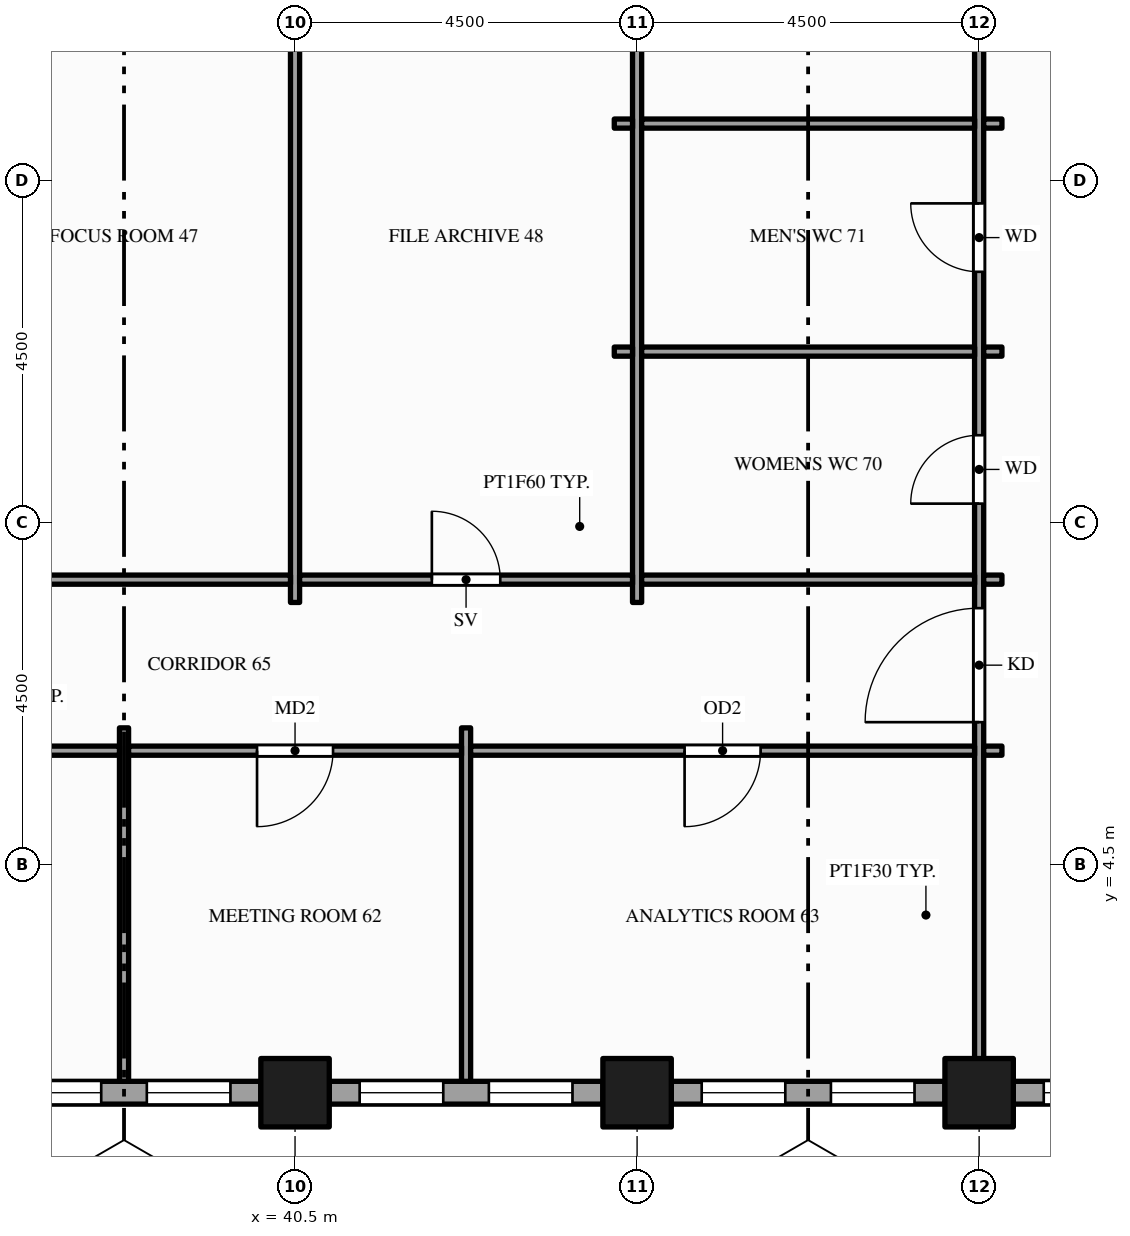
"""IFC4 building model, lengths in metres.
Left out: names, types, materials, properties, quantities, classifications, styles, units other than length and angle.
Written with IfcOpenShell. Run it as: python <this file> out.ifc"""

import sys

from ifc_helpers import new_model, si_unit, direction, frame, frame_2d, origin, origin_2d, place, context, subcontext, project, spatial, rectangle, hollow_rectangle, extrude, element, fill, save


model = new_model("IFC4")
c1 = context("Model", 3, precision=1e-05, world=origin(), true_north=direction((0.0, 1.0)))
c2 = subcontext(c1, "Body", "Model", "MODEL_VIEW")
j1 = project(units=[si_unit("LENGTHUNIT", "METRE"), si_unit("PLANEANGLEUNIT", "RADIAN")], contexts=[c1])
p1 = place(None, origin())
s1 = spatial("IfcSite", under=j1, at=p1, CompositionType="ELEMENT")
p2 = place(p1, origin())
s2 = spatial("IfcBuilding", under=s1, at=p2, CompositionType="ELEMENT")
p3 = place(p2, frame((0.0, 0.0, 179.0)))
s3 = spatial("IfcBuildingStorey", under=s2, at=p3, CompositionType="ELEMENT", Elevation=179.0)
for number, where, z_axis, x_axis in (
    (1, (40.5, 1.5, -0.15), (0.0, 0.0, 1.0), (1.0, 0.0, 0.0)),
    (2, (45.0, 1.5, -0.15), (0.0, 0.0, 1.0), (1.0, 0.0, 0.0)),
    (3, (49.5, 1.5, -0.15), (0.0, 0.0, 1.0), (1.0, 0.0, 0.0)),
):
    element("IfcColumn", number, at=place(p3, frame(where, z_axis=z_axis, x_axis=x_axis)), inside=s3, PredefinedType="COLUMN", context=c2, shape_type="SweptSolid", body=[
        extrude(hollow_rectangle(XDim=0.9, YDim=0.9, WallThickness=0.045, at=origin_2d()), origin(), (0.0, 0.0, 1.0), 4.0),
    ])
p4 = place(p3, frame((36.45, 1.5, 0.0), z_axis=(0.0, 0.0, 1.0), x_axis=(1.0, 0.0, 0.0)))
e4 = element("IfcWall", 4, at=p4, inside=s3, PredefinedType="STANDARD", context=c2, shape_type="SweptSolid", body=[
    extrude(rectangle(XDim=3.6, YDim=0.3, at=frame_2d((1.8, 0.0))), origin(), (0.0, 0.0, 1.0), 2.87),
])
p5 = place(p4, frame((0.4, 0.0, 0.9)))
e5 = element("IfcOpeningElement", 5, at=p5, cuts=e4, PredefinedType="OPENING", context=c2, shape_type="SweptSolid", body=[
    extrude(rectangle(XDim=1.1, YDim=1.75, at=frame_2d((0.55, 0.875))), frame((0.0, 0.16, 0.0), z_axis=(0.0, -1.0, 0.0), x_axis=(1.0, 0.0, 0.0)), (0.0, 0.0, 1.0), 0.32),
])
p6 = place(p4, frame((2.1, 0.0, 0.9)))
e6 = element("IfcOpeningElement", 6, at=p6, cuts=e4, PredefinedType="OPENING", context=c2, shape_type="SweptSolid", body=[
    extrude(rectangle(XDim=1.1, YDim=1.75, at=frame_2d((0.55, 0.875))), frame((0.0, 0.16, 0.0), z_axis=(0.0, -1.0, 0.0), x_axis=(1.0, 0.0, 0.0)), (0.0, 0.0, 1.0), 0.32),
])
p7 = place(p3, frame((40.95, 1.5, 0.0), z_axis=(0.0, 0.0, 1.0), x_axis=(1.0, 0.0, 0.0)))
e7 = element("IfcWall", 7, at=p7, inside=s3, PredefinedType="STANDARD", context=c2, shape_type="SweptSolid", body=[
    extrude(rectangle(XDim=3.6, YDim=0.3, at=frame_2d((1.8, 0.0))), origin(), (0.0, 0.0, 1.0), 2.87),
])
p8 = place(p7, frame((0.4, 0.0, 0.9)))
e8 = element("IfcOpeningElement", 8, at=p8, cuts=e7, PredefinedType="OPENING", context=c2, shape_type="SweptSolid", body=[
    extrude(rectangle(XDim=1.1, YDim=1.75, at=frame_2d((0.55, 0.875))), frame((0.0, 0.16, 0.0), z_axis=(0.0, -1.0, 0.0), x_axis=(1.0, 0.0, 0.0)), (0.0, 0.0, 1.0), 0.32),
])
p9 = place(p7, frame((2.1, 0.0, 0.9)))
e9 = element("IfcOpeningElement", 9, at=p9, cuts=e7, PredefinedType="OPENING", context=c2, shape_type="SweptSolid", body=[
    extrude(rectangle(XDim=1.1, YDim=1.75, at=frame_2d((0.55, 0.875))), frame((0.0, 0.16, 0.0), z_axis=(0.0, -1.0, 0.0), x_axis=(1.0, 0.0, 0.0)), (0.0, 0.0, 1.0), 0.32),
])
p10 = place(p3, frame((45.45, 1.5, 0.0), z_axis=(0.0, 0.0, 1.0), x_axis=(1.0, 0.0, 0.0)))
e10 = element("IfcWall", 10, at=p10, inside=s3, PredefinedType="STANDARD", context=c2, shape_type="SweptSolid", body=[
    extrude(rectangle(XDim=3.6, YDim=0.3, at=frame_2d((1.8, 0.0))), origin(), (0.0, 0.0, 1.0), 2.87),
])
p11 = place(p10, frame((0.4, 0.0, 0.9)))
e11 = element("IfcOpeningElement", 11, at=p11, cuts=e10, PredefinedType="OPENING", context=c2, shape_type="SweptSolid", body=[
    extrude(rectangle(XDim=1.1, YDim=1.75, at=frame_2d((0.55, 0.875))), frame((0.0, 0.16, 0.0), z_axis=(0.0, -1.0, 0.0), x_axis=(1.0, 0.0, 0.0)), (0.0, 0.0, 1.0), 0.32),
])
p12 = place(p10, frame((2.1, 0.0, 0.9)))
e12 = element("IfcOpeningElement", 12, at=p12, cuts=e10, PredefinedType="OPENING", context=c2, shape_type="SweptSolid", body=[
    extrude(rectangle(XDim=1.1, YDim=1.75, at=frame_2d((0.55, 0.875))), frame((0.0, 0.16, 0.0), z_axis=(0.0, -1.0, 0.0), x_axis=(1.0, 0.0, 0.0)), (0.0, 0.0, 1.0), 0.32),
])
p13 = place(p3, frame((49.95, 1.5, 0.0), z_axis=(0.0, 0.0, 1.0), x_axis=(1.0, 0.0, 0.0)))
e13 = element("IfcWall", 13, at=p13, inside=s3, PredefinedType="STANDARD", context=c2, shape_type="SweptSolid", body=[
    extrude(rectangle(XDim=4.05, YDim=0.3, at=frame_2d((2.025, 0.0))), origin(), (0.0, 0.0, 1.0), 2.87),
])
p14 = place(p13, frame((0.4, 0.0, 0.9)))
e14 = element("IfcOpeningElement", 14, at=p14, cuts=e13, PredefinedType="OPENING", context=c2, shape_type="SweptSolid", body=[
    extrude(rectangle(XDim=1.1, YDim=1.75, at=frame_2d((0.55, 0.875))), frame((0.0, 0.16, 0.0), z_axis=(0.0, -1.0, 0.0), x_axis=(1.0, 0.0, 0.0)), (0.0, 0.0, 1.0), 0.32),
])
p15 = place(p13, frame((2.1, 0.0, 0.9)))
e15 = element("IfcOpeningElement", 15, at=p15, cuts=e13, PredefinedType="OPENING", context=c2, shape_type="SweptSolid", body=[
    extrude(rectangle(XDim=1.55, YDim=1.75, at=frame_2d((0.775, 0.875))), frame((0.0, 0.16, 0.0), z_axis=(0.0, -1.0, 0.0), x_axis=(1.0, 0.0, 0.0)), (0.0, 0.0, 1.0), 0.32),
])
p16 = place(p3, frame((38.25, 1.65, 0.0), z_axis=(0.0, 0.0, 1.0), x_axis=(0.0, 1.0, 0.0)))
e16 = element("IfcWall", 16, at=p16, inside=s3, PredefinedType="PARTITIONING", context=c2, shape_type="SweptSolid", body=[
    extrude(rectangle(XDim=4.65, YDim=0.12, at=frame_2d((2.325, 0.0))), origin(), (0.0, 0.0, 1.0), 2.87),
])
p17 = place(p3, frame((40.5, 7.95, 0.0), z_axis=(0.0, 0.0, 1.0), x_axis=(0.0, 1.0, 0.0)))
e17 = element("IfcWall", 17, at=p17, inside=s3, PredefinedType="PARTITIONING", context=c2, shape_type="SweptSolid", body=[
    extrude(rectangle(XDim=9.6, YDim=0.12, at=frame_2d((4.8, 0.0))), origin(), (0.0, 0.0, 1.0), 2.87),
])
p18 = place(p3, frame((42.75, 1.65, 0.0), z_axis=(0.0, 0.0, 1.0), x_axis=(0.0, 1.0, 0.0)))
e18 = element("IfcWall", 18, at=p18, inside=s3, PredefinedType="PARTITIONING", context=c2, shape_type="SweptSolid", body=[
    extrude(rectangle(XDim=4.65, YDim=0.12, at=frame_2d((2.325, 0.0))), origin(), (0.0, 0.0, 1.0), 2.87),
])
p19 = place(p3, frame((45.0, 7.95, 0.0), z_axis=(0.0, 0.0, 1.0), x_axis=(0.0, 1.0, 0.0)))
e19 = element("IfcWall", 19, at=p19, inside=s3, PredefinedType="PARTITIONING", context=c2, shape_type="SweptSolid", body=[
    extrude(rectangle(XDim=9.6, YDim=0.12, at=frame_2d((4.8, 0.0))), origin(), (0.0, 0.0, 1.0), 2.87),
])
p20 = place(p3, frame((49.5, 1.65, 0.0), z_axis=(0.0, 0.0, 1.0), x_axis=(0.0, 1.0, 0.0)))
e20 = element("IfcWall", 20, at=p20, inside=s3, PredefinedType="PARTITIONING", context=c2, shape_type="SweptSolid", body=[
    extrude(rectangle(XDim=22.2, YDim=0.12, at=frame_2d((11.1, 0.0))), origin(), (0.0, 0.0, 1.0), 2.87),
])
p21 = place(p20, frame((4.725, 0.0, 0.0)))
e21 = element("IfcOpeningElement", 21, at=p21, cuts=e20, PredefinedType="OPENING", context=c2, shape_type="SweptSolid", body=[
    extrude(rectangle(XDim=1.5, YDim=2.1, at=frame_2d((0.75, 1.05))), frame((0.0, 0.07, 0.0), z_axis=(0.0, -1.0, 0.0), x_axis=(1.0, 0.0, 0.0)), (0.0, 0.0, 1.0), 0.14),
])
p22 = place(p20, frame((15.975, 0.0, 0.0)))
e22 = element("IfcOpeningElement", 22, at=p22, cuts=e20, PredefinedType="OPENING", context=c2, shape_type="SweptSolid", body=[
    extrude(rectangle(XDim=1.5, YDim=2.1, at=frame_2d((0.75, 1.05))), frame((0.0, 0.07, 0.0), z_axis=(0.0, -1.0, 0.0), x_axis=(1.0, 0.0, 0.0)), (0.0, 0.0, 1.0), 0.14),
])
p23 = place(p20, frame((7.6, 0.0, 0.0)))
e23 = element("IfcOpeningElement", 23, at=p23, cuts=e20, PredefinedType="OPENING", context=c2, shape_type="SweptSolid", body=[
    extrude(rectangle(XDim=0.9, YDim=2.1, at=frame_2d((0.45, 1.05))), frame((0.0, 0.07, 0.0), z_axis=(0.0, -1.0, 0.0), x_axis=(1.0, 0.0, 0.0)), (0.0, 0.0, 1.0), 0.14),
])
p24 = place(p20, frame((10.65, 0.0, 0.0)))
e24 = element("IfcOpeningElement", 24, at=p24, cuts=e20, PredefinedType="OPENING", context=c2, shape_type="SweptSolid", body=[
    extrude(rectangle(XDim=0.9, YDim=2.1, at=frame_2d((0.45, 1.05))), frame((0.0, 0.07, 0.0), z_axis=(0.0, -1.0, 0.0), x_axis=(1.0, 0.0, 0.0)), (0.0, 0.0, 1.0), 0.14),
])
p25 = place(p20, frame((13.6, 0.0, 0.0)))
e25 = element("IfcOpeningElement", 25, at=p25, cuts=e20, PredefinedType="OPENING", context=c2, shape_type="SweptSolid", body=[
    extrude(rectangle(XDim=1.0, YDim=2.1, at=frame_2d((0.5, 1.05))), frame((0.0, 0.07, 0.0), z_axis=(0.0, -1.0, 0.0), x_axis=(1.0, 0.0, 0.0)), (0.0, 0.0, 1.0), 0.14),
])
p26 = place(p3, frame((31.56, 6.0, 0.0), z_axis=(0.0, 0.0, 1.0), x_axis=(1.0, 0.0, 0.0)))
e26 = element("IfcWall", 26, at=p26, inside=s3, PredefinedType="PARTITIONING", context=c2, shape_type="SweptSolid", body=[
    extrude(rectangle(XDim=6.63, YDim=0.12, at=frame_2d((3.315, 0.0))), origin(), (0.0, 0.0, 1.0), 2.87),
])
p27 = place(p26, frame((2.815, 0.0, 0.0)))
e27 = element("IfcOpeningElement", 27, at=p27, cuts=e26, PredefinedType="OPENING", context=c2, shape_type="SweptSolid", body=[
    extrude(rectangle(XDim=1.0, YDim=2.1, at=frame_2d((0.5, 1.05))), frame((0.0, 0.07, 0.0), z_axis=(0.0, -1.0, 0.0), x_axis=(1.0, 0.0, 0.0)), (0.0, 0.0, 1.0), 0.14),
])
p28 = place(p3, frame((38.31, 6.0, 0.0), z_axis=(0.0, 0.0, 1.0), x_axis=(1.0, 0.0, 0.0)))
e28 = element("IfcWall", 28, at=p28, inside=s3, PredefinedType="PARTITIONING", context=c2, shape_type="SweptSolid", body=[
    extrude(rectangle(XDim=4.38, YDim=0.12, at=frame_2d((2.19, 0.0))), origin(), (0.0, 0.0, 1.0), 2.87),
])
p29 = place(p28, frame((1.69, 0.0, 0.0)))
e29 = element("IfcOpeningElement", 29, at=p29, cuts=e28, PredefinedType="OPENING", context=c2, shape_type="SweptSolid", body=[
    extrude(rectangle(XDim=1.0, YDim=2.1, at=frame_2d((0.5, 1.05))), frame((0.0, 0.07, 0.0), z_axis=(0.0, -1.0, 0.0), x_axis=(1.0, 0.0, 0.0)), (0.0, 0.0, 1.0), 0.14),
])
p30 = place(p3, frame((42.81, 6.0, 0.0), z_axis=(0.0, 0.0, 1.0), x_axis=(1.0, 0.0, 0.0)))
e30 = element("IfcWall", 30, at=p30, inside=s3, PredefinedType="PARTITIONING", context=c2, shape_type="SweptSolid", body=[
    extrude(rectangle(XDim=6.63, YDim=0.12, at=frame_2d((3.315, 0.0))), origin(), (0.0, 0.0, 1.0), 2.87),
])
p31 = place(p30, frame((2.815, 0.0, 0.0)))
e31 = element("IfcOpeningElement", 31, at=p31, cuts=e30, PredefinedType="OPENING", context=c2, shape_type="SweptSolid", body=[
    extrude(rectangle(XDim=1.0, YDim=2.1, at=frame_2d((0.5, 1.05))), frame((0.0, 0.07, 0.0), z_axis=(0.0, -1.0, 0.0), x_axis=(1.0, 0.0, 0.0)), (0.0, 0.0, 1.0), 0.14),
])
p32 = place(p3, frame((49.56, 6.0, 0.0), z_axis=(0.0, 0.0, 1.0), x_axis=(1.0, 0.0, 0.0)))
e32 = element("IfcWall", 32, at=p32, inside=s3, PredefinedType="PARTITIONING", context=c2, shape_type="SweptSolid", body=[
    extrude(rectangle(XDim=0.24, YDim=0.12, at=frame_2d((0.12, 0.0))), origin(), (0.0, 0.0, 1.0), 2.87),
])
p33 = place(p3, frame((36.06, 8.25, 0.0), z_axis=(0.0, 0.0, 1.0), x_axis=(1.0, 0.0, 0.0)))
e33 = element("IfcWall", 33, at=p33, inside=s3, PredefinedType="PARTITIONING", context=c2, shape_type="SweptSolid", body=[
    extrude(rectangle(XDim=4.38, YDim=0.12, at=frame_2d((2.19, 0.0))), origin(), (0.0, 0.0, 1.0), 2.87),
])
p34 = place(p3, frame((40.56, 8.25, 0.0), z_axis=(0.0, 0.0, 1.0), x_axis=(1.0, 0.0, 0.0)))
e34 = element("IfcWall", 34, at=p34, inside=s3, PredefinedType="PARTITIONING", context=c2, shape_type="SweptSolid", body=[
    extrude(rectangle(XDim=4.38, YDim=0.12, at=frame_2d((2.19, 0.0))), origin(), (0.0, 0.0, 1.0), 2.87),
])
p35 = place(p34, frame((1.74, 0.0, 0.0)))
e35 = element("IfcOpeningElement", 35, at=p35, cuts=e34, PredefinedType="OPENING", context=c2, shape_type="SweptSolid", body=[
    extrude(rectangle(XDim=0.9, YDim=2.1, at=frame_2d((0.45, 1.05))), frame((0.0, 0.07, 0.0), z_axis=(0.0, -1.0, 0.0), x_axis=(1.0, 0.0, 0.0)), (0.0, 0.0, 1.0), 0.14),
])
p36 = place(p3, frame((45.06, 8.25, 0.0), z_axis=(0.0, 0.0, 1.0), x_axis=(1.0, 0.0, 0.0)))
e36 = element("IfcWall", 36, at=p36, inside=s3, PredefinedType="PARTITIONING", context=c2, shape_type="SweptSolid", body=[
    extrude(rectangle(XDim=4.38, YDim=0.12, at=frame_2d((2.19, 0.0))), origin(), (0.0, 0.0, 1.0), 2.87),
])
for number, where, z_axis, x_axis in (
    (37, (49.56, 8.25, 0.0), (0.0, 0.0, 1.0), (1.0, 0.0, 0.0)),
    (38, (44.7, 11.25, 0.0), (0.0, 0.0, 1.0), (1.0, 0.0, 0.0)),
):
    element("IfcWall", number, at=place(p3, frame(where, z_axis=z_axis, x_axis=x_axis)), inside=s3, PredefinedType="PARTITIONING", context=c2, shape_type="SweptSolid", body=[
        extrude(rectangle(XDim=0.24, YDim=0.12, at=frame_2d((0.12, 0.0))), origin(), (0.0, 0.0, 1.0), 2.87),
    ])
p37 = place(p3, frame((45.06, 11.25, 0.0), z_axis=(0.0, 0.0, 1.0), x_axis=(1.0, 0.0, 0.0)))
e39 = element("IfcWall", 39, at=p37, inside=s3, PredefinedType="PARTITIONING", context=c2, shape_type="SweptSolid", body=[
    extrude(rectangle(XDim=4.38, YDim=0.12, at=frame_2d((2.19, 0.0))), origin(), (0.0, 0.0, 1.0), 2.87),
])
for number, where, z_axis, x_axis in (
    (40, (49.56, 11.25, 0.0), (0.0, 0.0, 1.0), (1.0, 0.0, 0.0)),
    (41, (44.7, 14.25, 0.0), (0.0, 0.0, 1.0), (1.0, 0.0, 0.0)),
):
    element("IfcWall", number, at=place(p3, frame(where, z_axis=z_axis, x_axis=x_axis)), inside=s3, PredefinedType="PARTITIONING", context=c2, shape_type="SweptSolid", body=[
        extrude(rectangle(XDim=0.24, YDim=0.12, at=frame_2d((0.12, 0.0))), origin(), (0.0, 0.0, 1.0), 2.87),
    ])
p38 = place(p3, frame((45.06, 14.25, 0.0), z_axis=(0.0, 0.0, 1.0), x_axis=(1.0, 0.0, 0.0)))
e42 = element("IfcWall", 42, at=p38, inside=s3, PredefinedType="PARTITIONING", context=c2, shape_type="SweptSolid", body=[
    extrude(rectangle(XDim=4.38, YDim=0.12, at=frame_2d((2.19, 0.0))), origin(), (0.0, 0.0, 1.0), 2.87),
])
p39 = place(p3, frame((49.56, 14.25, 0.0), z_axis=(0.0, 0.0, 1.0), x_axis=(1.0, 0.0, 0.0)))
e43 = element("IfcWall", 43, at=p39, inside=s3, PredefinedType="PARTITIONING", context=c2, shape_type="SweptSolid", body=[
    extrude(rectangle(XDim=0.24, YDim=0.12, at=frame_2d((0.12, 0.0))), origin(), (0.0, 0.0, 1.0), 2.87),
])
p40 = place(p5, origin())
e44 = element("IfcWindow", 44, at=p40, inside=s3, PartitioningType="SINGLE_PANEL", PredefinedType="WINDOW", context=c2, shape_type="SweptSolid", body=[
    extrude(rectangle(XDim=1.1, YDim=1.75, at=frame_2d((0.55, 0.875))), frame((0.0, 0.03, 0.0), z_axis=(0.0, -1.0, 0.0), x_axis=(1.0, 0.0, 0.0)), (0.0, 0.0, 1.0), 0.06),
])
fill(e5, e44)
p41 = place(p6, origin())
e45 = element("IfcWindow", 45, at=p41, inside=s3, PartitioningType="SINGLE_PANEL", PredefinedType="WINDOW", context=c2, shape_type="SweptSolid", body=[
    extrude(rectangle(XDim=1.1, YDim=1.75, at=frame_2d((0.55, 0.875))), frame((0.0, 0.03, 0.0), z_axis=(0.0, -1.0, 0.0), x_axis=(1.0, 0.0, 0.0)), (0.0, 0.0, 1.0), 0.06),
])
fill(e6, e45)
p42 = place(p8, origin())
e46 = element("IfcWindow", 46, at=p42, inside=s3, PartitioningType="SINGLE_PANEL", PredefinedType="WINDOW", context=c2, shape_type="SweptSolid", body=[
    extrude(rectangle(XDim=1.1, YDim=1.75, at=frame_2d((0.55, 0.875))), frame((0.0, 0.03, 0.0), z_axis=(0.0, -1.0, 0.0), x_axis=(1.0, 0.0, 0.0)), (0.0, 0.0, 1.0), 0.06),
])
fill(e8, e46)
p43 = place(p9, origin())
e47 = element("IfcWindow", 47, at=p43, inside=s3, PartitioningType="SINGLE_PANEL", PredefinedType="WINDOW", context=c2, shape_type="SweptSolid", body=[
    extrude(rectangle(XDim=1.1, YDim=1.75, at=frame_2d((0.55, 0.875))), frame((0.0, 0.03, 0.0), z_axis=(0.0, -1.0, 0.0), x_axis=(1.0, 0.0, 0.0)), (0.0, 0.0, 1.0), 0.06),
])
fill(e9, e47)
p44 = place(p11, origin())
e48 = element("IfcWindow", 48, at=p44, inside=s3, PartitioningType="SINGLE_PANEL", PredefinedType="WINDOW", context=c2, shape_type="SweptSolid", body=[
    extrude(rectangle(XDim=1.1, YDim=1.75, at=frame_2d((0.55, 0.875))), frame((0.0, 0.03, 0.0), z_axis=(0.0, -1.0, 0.0), x_axis=(1.0, 0.0, 0.0)), (0.0, 0.0, 1.0), 0.06),
])
fill(e11, e48)
p45 = place(p12, origin())
e49 = element("IfcWindow", 49, at=p45, inside=s3, PartitioningType="SINGLE_PANEL", PredefinedType="WINDOW", context=c2, shape_type="SweptSolid", body=[
    extrude(rectangle(XDim=1.1, YDim=1.75, at=frame_2d((0.55, 0.875))), frame((0.0, 0.03, 0.0), z_axis=(0.0, -1.0, 0.0), x_axis=(1.0, 0.0, 0.0)), (0.0, 0.0, 1.0), 0.06),
])
fill(e12, e49)
p46 = place(p14, origin())
e50 = element("IfcWindow", 50, at=p46, inside=s3, PartitioningType="SINGLE_PANEL", PredefinedType="WINDOW", context=c2, shape_type="SweptSolid", body=[
    extrude(rectangle(XDim=1.1, YDim=1.75, at=frame_2d((0.55, 0.875))), frame((0.0, 0.03, 0.0), z_axis=(0.0, -1.0, 0.0), x_axis=(1.0, 0.0, 0.0)), (0.0, 0.0, 1.0), 0.06),
])
fill(e14, e50)
p47 = place(p21, origin())
e51 = element("IfcDoor", 51, at=p47, inside=s3, OperationType="SINGLE_SWING_LEFT", PredefinedType="DOOR", context=c2, shape_type="SweptSolid", body=[
    extrude(rectangle(XDim=1.5, YDim=2.1, at=frame_2d((0.75, 1.05))), frame((0.0, 0.025, 0.0), z_axis=(0.0, -1.0, 0.0), x_axis=(1.0, 0.0, 0.0)), (0.0, 0.0, 1.0), 0.05),
])
fill(e21, e51)
p48 = place(p35, origin())
e52 = element("IfcDoor", 52, at=p48, inside=s3, OperationType="SINGLE_SWING_LEFT", PredefinedType="DOOR", context=c2, shape_type="SweptSolid", body=[
    extrude(rectangle(XDim=0.9, YDim=2.1, at=frame_2d((0.45, 1.05))), frame((0.0, 0.025, 0.0), z_axis=(0.0, -1.0, 0.0), x_axis=(1.0, 0.0, 0.0)), (0.0, 0.0, 1.0), 0.05),
])
fill(e35, e52)
p49 = place(p23, origin())
e53 = element("IfcDoor", 53, at=p49, inside=s3, OperationType="SINGLE_SWING_LEFT", PredefinedType="DOOR", context=c2, shape_type="SweptSolid", body=[
    extrude(rectangle(XDim=0.9, YDim=2.1, at=frame_2d((0.45, 1.05))), frame((0.0, 0.025, 0.0), z_axis=(0.0, -1.0, 0.0), x_axis=(1.0, 0.0, 0.0)), (0.0, 0.0, 1.0), 0.05),
])
fill(e23, e53)
p50 = place(p24, origin())
e54 = element("IfcDoor", 54, at=p50, inside=s3, OperationType="SINGLE_SWING_RIGHT", PredefinedType="DOOR", context=c2, shape_type="SweptSolid", body=[
    extrude(rectangle(XDim=0.9, YDim=2.1, at=frame_2d((0.45, 1.05))), frame((0.0, 0.025, 0.0), z_axis=(0.0, -1.0, 0.0), x_axis=(1.0, 0.0, 0.0)), (0.0, 0.0, 1.0), 0.05),
])
fill(e24, e54)
p51 = place(p29, origin())
e55 = element("IfcDoor", 55, at=p51, inside=s3, OperationType="SINGLE_SWING_LEFT", PredefinedType="DOOR", context=c2, shape_type="SweptSolid", body=[
    extrude(rectangle(XDim=1.0, YDim=2.1, at=frame_2d((0.5, 1.05))), frame((0.0, 0.025, 0.0), z_axis=(0.0, -1.0, 0.0), x_axis=(1.0, 0.0, 0.0)), (0.0, 0.0, 1.0), 0.05),
])
fill(e29, e55)
p52 = place(p31, origin())
e56 = element("IfcDoor", 56, at=p52, inside=s3, OperationType="SINGLE_SWING_LEFT", PredefinedType="DOOR", context=c2, shape_type="SweptSolid", body=[
    extrude(rectangle(XDim=1.0, YDim=2.1, at=frame_2d((0.5, 1.05))), frame((0.0, 0.025, 0.0), z_axis=(0.0, -1.0, 0.0), x_axis=(1.0, 0.0, 0.0)), (0.0, 0.0, 1.0), 0.05),
])
fill(e31, e56)
save(model, sys.argv[1])
